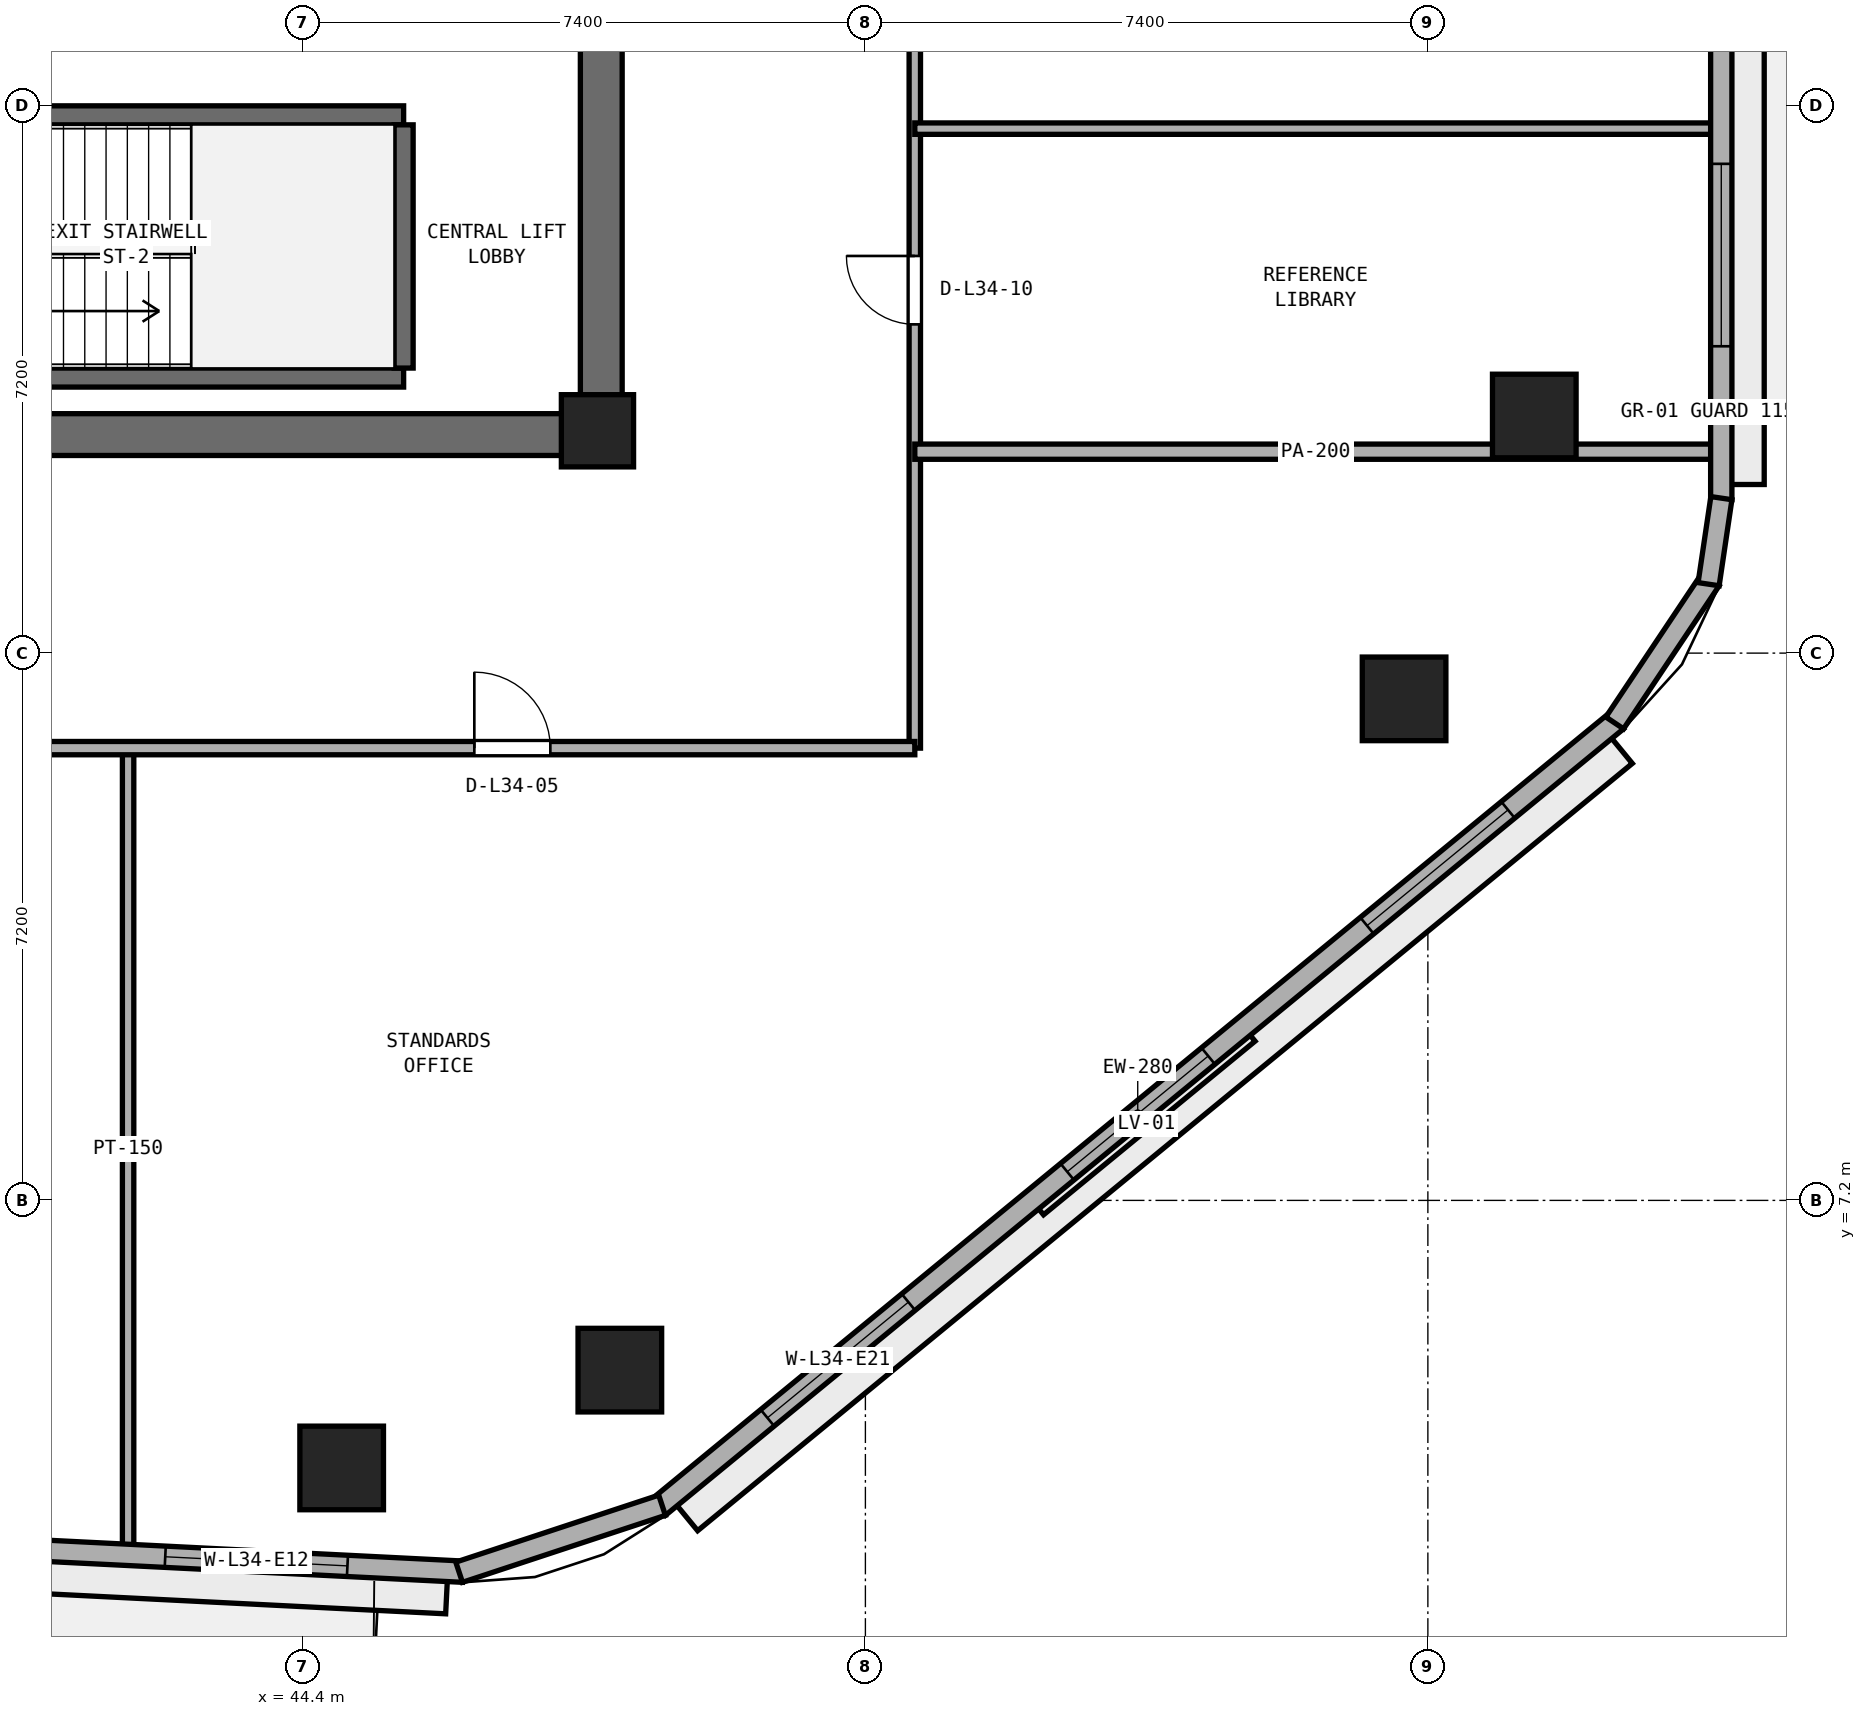
"""IFC4 building model, lengths in metres.
Left out: names, types, materials, properties, quantities, classifications, styles, units other than length and angle.
Written with IfcOpenShell. Run it as: python <this file> out.ifc"""

import sys

from ifc_helpers import new_model, si_unit, direction, frame, frame_2d, origin, origin_2d, place, context, subcontext, project, spatial, rectangle, extrude, element, fill, save


model = new_model("IFC4")
c1 = context("Model", 3, precision=1e-05, world=origin(), true_north=direction((0.0, 1.0)))
c2 = subcontext(c1, "Body", "Model", "MODEL_VIEW")
j1 = project(units=[si_unit("LENGTHUNIT", "METRE"), si_unit("PLANEANGLEUNIT", "RADIAN")], contexts=[c1])
p1 = place(None, origin())
s1 = spatial("IfcSite", under=j1, at=p1, CompositionType="ELEMENT")
p2 = place(p1, origin())
s2 = spatial("IfcBuilding", under=s1, at=p2, CompositionType="ELEMENT")
p3 = place(p2, frame((0.0, 0.0, 136.4)))
s3 = spatial("IfcBuildingStorey", under=s2, at=p3, CompositionType="ELEMENT", Elevation=136.4)
p4 = place(p3, frame((25.4, 17.275, 0.0), z_axis=(0.0, 0.0, 1.0), x_axis=(1.0, 0.0, 0.0)))
e1 = element("IfcWall", 1, at=p4, inside=s3, PredefinedType="SHEAR", context=c2, shape_type="SweptSolid", body=[
    extrude(rectangle(XDim=23.2, YDim=0.55, at=frame_2d((11.6, 0.0))), origin(), (0.0, 0.0, 1.0), 3.54),
])
p5 = place(p3, frame((48.325, 17.55, 0.0), z_axis=(0.0, 0.0, 1.0), x_axis=(0.0, 1.0, 0.0)))
e2 = element("IfcWall", 2, at=p5, inside=s3, PredefinedType="SHEAR", context=c2, shape_type="SweptSolid", body=[
    extrude(rectangle(XDim=15.3, YDim=0.55, at=frame_2d((7.65, 0.0))), origin(), (0.0, 0.0, 1.0), 3.54),
])
p6 = place(p5, frame((5.75, 0.0, 0.0)))
e3 = element("IfcOpeningElement", 3, at=p6, cuts=e2, PredefinedType="OPENING", context=c2, shape_type="SweptSolid", body=[
    extrude(rectangle(XDim=1.5, YDim=2.15, at=frame_2d((0.75, 1.075))), frame((0.0, 0.285, 0.0), z_axis=(0.0, -1.0, 0.0), x_axis=(1.0, 0.0, 0.0)), (0.0, 0.0, 1.0), 0.57),
])
p7 = place(p3, frame((48.275, 17.325, 0.0), z_axis=(0.0, 0.0, 1.0), x_axis=(1.0, 0.0, 0.0)))
e4 = element("IfcColumn", 4, at=p7, inside=s3, PredefinedType="PILASTER", context=c2, shape_type="SweptSolid", body=[
    extrude(rectangle(XDim=0.95, YDim=0.95, at=origin_2d()), origin(), (0.0, 0.0, 1.0), 3.8),
])
for number, where, z_axis, x_axis in (
    (5, (44.91, 3.68, 0.0), (0.0, 0.0, 1.0), (1.0, 0.0, 0.0)),
    (6, (48.57, 4.967, 0.0), (0.0, 0.0, 1.0), (1.0, 0.0, 0.0)),
    (7, (58.887, 13.798, 0.0), (0.0, 0.0, 1.0), (1.0, 0.0, 0.0)),
    (8, (60.6, 17.519, 0.0), (0.0, 0.0, 1.0), (1.0, 0.0, 0.0)),
):
    element("IfcColumn", number, at=place(p3, frame(where, z_axis=z_axis, x_axis=x_axis)), inside=s3, PredefinedType="COLUMN", context=c2, shape_type="SweptSolid", body=[
        extrude(rectangle(XDim=1.1, YDim=1.1, at=origin_2d()), origin(), (0.0, 0.0, 1.0), 3.8),
    ])
for number, where, z_axis, x_axis in (
    (9, (38.425, 18.025, 0.0), (0.0, 0.0, 1.0), (1.0, 0.0, 0.0)),
    (10, (38.425, 21.475, 0.0), (0.0, 0.0, 1.0), (1.0, 0.0, 0.0)),
):
    element("IfcWall", number, at=place(p3, frame(where, z_axis=z_axis, x_axis=x_axis)), inside=s3, PredefinedType="SHEAR", context=c2, shape_type="SweptSolid", body=[
        extrude(rectangle(XDim=7.3, YDim=0.25, at=frame_2d((3.65, 0.0))), origin(), (0.0, 0.0, 1.0), 3.54),
    ])
p8 = place(p3, frame((45.725, 18.15, 0.0), z_axis=(0.0, 0.0, 1.0), x_axis=(0.0, 1.0, 0.0)))
e11 = element("IfcWall", 11, at=p8, inside=s3, PredefinedType="SHEAR", context=c2, shape_type="SweptSolid", body=[
    extrude(rectangle(XDim=3.2, YDim=0.25, at=frame_2d((1.6, 0.0))), origin(), (0.0, 0.0, 1.0), 3.54),
])
p9 = place(p3, frame((52.45, 13.15, 0.0), z_axis=(0.0, 0.0, 1.0), x_axis=(0.0, 1.0, 0.0)))
e12 = element("IfcWall", 12, at=p9, inside=s3, PredefinedType="PARTITIONING", context=c2, shape_type="SweptSolid", body=[
    extrude(rectangle(XDim=10.7, YDim=0.15, at=frame_2d((5.35, 0.0))), origin(), (0.0, 0.0, 1.0), 3.54),
])
p10 = place(p9, frame((5.575, 0.0, 0.0)))
e13 = element("IfcOpeningElement", 13, at=p10, cuts=e12, PredefinedType="OPENING", context=c2, shape_type="SweptSolid", body=[
    extrude(rectangle(XDim=0.9, YDim=2.1, at=frame_2d((0.45, 1.05))), frame((0.0, 0.085, 0.0), z_axis=(0.0, -1.0, 0.0), x_axis=(1.0, 0.0, 0.0)), (0.0, 0.0, 1.0), 0.17),
])
p11 = place(p3, frame((42.1, 2.601, 0.0), z_axis=(0.0, 0.0, 1.0), x_axis=(0.0, 1.0, 0.0)))
e14 = element("IfcWall", 14, at=p11, inside=s3, PredefinedType="PARTITIONING", context=c2, shape_type="SweptSolid", body=[
    extrude(rectangle(XDim=10.549, YDim=0.15, at=frame_2d((5.274, 0.0))), origin(), (0.0, 0.0, 1.0), 3.54),
])
p12 = place(p3, frame((21.55, 13.15, 0.0), z_axis=(0.0, 0.0, 1.0), x_axis=(1.0, 0.0, 0.0)))
e15 = element("IfcWall", 15, at=p12, inside=s3, PredefinedType="PARTITIONING", context=c2, shape_type="SweptSolid", body=[
    extrude(rectangle(XDim=30.9, YDim=0.175, at=frame_2d((15.45, 0.0))), origin(), (0.0, 0.0, 1.0), 3.54),
])
p13 = place(p12, frame((4.145, 0.0, 0.0)))
e16 = element("IfcOpeningElement", 16, at=p13, cuts=e15, PredefinedType="OPENING", context=c2, shape_type="SweptSolid", body=[
    extrude(rectangle(XDim=1.0, YDim=2.12, at=frame_2d((0.5, 1.06))), frame((0.0, 0.097, 0.0), z_axis=(0.0, -1.0, 0.0), x_axis=(1.0, 0.0, 0.0)), (0.0, 0.0, 1.0), 0.195),
])
p14 = place(p12, frame((14.3, 0.0, 0.0)))
e17 = element("IfcOpeningElement", 17, at=p14, cuts=e15, PredefinedType="OPENING", context=c2, shape_type="SweptSolid", body=[
    extrude(rectangle(XDim=1.0, YDim=2.12, at=frame_2d((0.5, 1.06))), frame((0.0, 0.097, 0.0), z_axis=(0.0, -1.0, 0.0), x_axis=(1.0, 0.0, 0.0)), (0.0, 0.0, 1.0), 0.195),
])
p15 = place(p12, frame((25.105, 0.0, 0.0)))
e18 = element("IfcOpeningElement", 18, at=p15, cuts=e15, PredefinedType="OPENING", context=c2, shape_type="SweptSolid", body=[
    extrude(rectangle(XDim=1.0, YDim=2.12, at=frame_2d((0.5, 1.06))), frame((0.0, 0.097, 0.0), z_axis=(0.0, -1.0, 0.0), x_axis=(1.0, 0.0, 0.0)), (0.0, 0.0, 1.0), 0.195),
])
p16 = place(p3, frame((52.45, 17.05, 0.0), z_axis=(0.0, 0.0, 1.0), x_axis=(1.0, 0.0, 0.0)))
e19 = element("IfcWall", 19, at=p16, inside=s3, PredefinedType="PARTITIONING", context=c2, shape_type="SweptSolid", body=[
    extrude(rectangle(XDim=10.545, YDim=0.2, at=frame_2d((5.272, 0.0))), origin(), (0.0, 0.0, 1.0), 3.54),
])
p17 = place(p3, frame((52.45, 21.3, 0.0), z_axis=(0.0, 0.0, 1.0), x_axis=(1.0, 0.0, 0.0)))
e20 = element("IfcWall", 20, at=p17, inside=s3, PredefinedType="PARTITIONING", context=c2, shape_type="SweptSolid", body=[
    extrude(rectangle(XDim=10.545, YDim=0.15, at=frame_2d((5.272, 0.0))), origin(), (0.0, 0.0, 1.0), 3.54),
])
p18 = place(p3, frame((29.195, 3.184, 0.0), z_axis=(0.0, 0.0, 1.0), x_axis=(0.998743400978, -0.05011605535, 0.0)))
e21 = element("IfcWall", 21, at=p18, inside=s3, PredefinedType="STANDARD", context=c2, shape_type="SweptSolid", body=[
    extrude(rectangle(XDim=17.333, YDim=0.28, at=frame_2d((8.667, 0.0))), origin(), (0.0, 0.0, 1.0), 3.54),
])
p19 = place(p18, frame((8.116, 0.0, 0.0)))
e22 = element("IfcOpeningElement", 22, at=p19, cuts=e21, PredefinedType="OPENING", context=c2, shape_type="SweptSolid", body=[
    extrude(rectangle(XDim=1.1, YDim=2.2, at=frame_2d((0.55, 1.1))), frame((0.0, 0.15, 0.0), z_axis=(0.0, -1.0, 0.0), x_axis=(1.0, 0.0, 0.0)), (0.0, 0.0, 1.0), 0.3),
])
p20 = place(p18, frame((2.022, 0.0, 0.9)))
e23 = element("IfcOpeningElement", 23, at=p20, cuts=e21, PredefinedType="OPENING", context=c2, shape_type="SweptSolid", body=[
    extrude(rectangle(XDim=2.4, YDim=1.75, at=frame_2d((1.2, 0.875))), frame((0.0, 0.15, 0.0), z_axis=(0.0, -1.0, 0.0), x_axis=(1.0, 0.0, 0.0)), (0.0, 0.0, 1.0), 0.3),
])
p21 = place(p18, frame((13.411, 0.0, 0.9)))
e24 = element("IfcOpeningElement", 24, at=p21, cuts=e21, PredefinedType="OPENING", context=c2, shape_type="SweptSolid", body=[
    extrude(rectangle(XDim=2.4, YDim=1.75, at=frame_2d((1.2, 0.875))), frame((0.0, 0.15, 0.0), z_axis=(0.0, -1.0, 0.0), x_axis=(1.0, 0.0, 0.0)), (0.0, 0.0, 1.0), 0.3),
])
p22 = place(p3, frame((49.08, 3.164, 0.0), z_axis=(0.0, 0.0, 1.0), x_axis=(0.772937830186, 0.634481765433, 0.0)))
e25 = element("IfcWall", 25, at=p22, inside=s3, PredefinedType="STANDARD", context=c2, shape_type="SweptSolid", body=[
    extrude(rectangle(XDim=16.309, YDim=0.28, at=frame_2d((8.154, 0.0))), origin(), (0.0, 0.0, 1.0), 3.54),
])
p23 = place(p22, frame((1.852, 0.0, 0.9)))
e26 = element("IfcOpeningElement", 26, at=p23, cuts=e25, PredefinedType="OPENING", context=c2, shape_type="SweptSolid", body=[
    extrude(rectangle(XDim=2.4, YDim=1.75, at=frame_2d((1.2, 0.875))), frame((0.0, 0.15, 0.0), z_axis=(0.0, -1.0, 0.0), x_axis=(1.0, 0.0, 0.0)), (0.0, 0.0, 1.0), 0.3),
])
p24 = place(p22, frame((6.954, 0.0, 0.9)))
e27 = element("IfcOpeningElement", 27, at=p24, cuts=e25, PredefinedType="OPENING", context=c2, shape_type="SweptSolid", body=[
    extrude(rectangle(XDim=2.4, YDim=1.75, at=frame_2d((1.2, 0.875))), frame((0.0, 0.15, 0.0), z_axis=(0.0, -1.0, 0.0), x_axis=(1.0, 0.0, 0.0)), (0.0, 0.0, 1.0), 0.3),
])
p25 = place(p22, frame((12.057, 0.0, 0.9)))
e28 = element("IfcOpeningElement", 28, at=p25, cuts=e25, PredefinedType="OPENING", context=c2, shape_type="SweptSolid", body=[
    extrude(rectangle(XDim=2.4, YDim=1.75, at=frame_2d((1.2, 0.875))), frame((0.0, 0.15, 0.0), z_axis=(0.0, -1.0, 0.0), x_axis=(1.0, 0.0, 0.0)), (0.0, 0.0, 1.0), 0.3),
])
p26 = place(p3, frame((63.06, 16.418, 0.0), z_axis=(0.0, 0.0, 1.0), x_axis=(0.0, 1.0, 0.0)))
e29 = element("IfcWall", 29, at=p26, inside=s3, PredefinedType="STANDARD", context=c2, shape_type="SweptSolid", body=[
    extrude(rectangle(XDim=18.812, YDim=0.28, at=frame_2d((9.406, 0.0))), origin(), (0.0, 0.0, 1.0), 3.54),
])
p27 = place(p26, frame((8.556, 0.0, 0.0)))
e30 = element("IfcOpeningElement", 30, at=p27, cuts=e29, PredefinedType="OPENING", context=c2, shape_type="SweptSolid", body=[
    extrude(rectangle(XDim=1.1, YDim=2.2, at=frame_2d((0.55, 1.1))), frame((0.0, 0.15, 0.0), z_axis=(0.0, -1.0, 0.0), x_axis=(1.0, 0.0, 0.0)), (0.0, 0.0, 1.0), 0.3),
])
p28 = place(p26, frame((2.019, 0.0, 0.9)))
e31 = element("IfcOpeningElement", 31, at=p28, cuts=e29, PredefinedType="OPENING", context=c2, shape_type="SweptSolid", body=[
    extrude(rectangle(XDim=2.4, YDim=1.75, at=frame_2d((1.2, 0.875))), frame((0.0, 0.15, 0.0), z_axis=(0.0, -1.0, 0.0), x_axis=(1.0, 0.0, 0.0)), (0.0, 0.0, 1.0), 0.3),
])
p29 = place(p26, frame((14.143, 0.0, 0.9)))
e32 = element("IfcOpeningElement", 32, at=p29, cuts=e29, PredefinedType="OPENING", context=c2, shape_type="SweptSolid", body=[
    extrude(rectangle(XDim=2.4, YDim=1.75, at=frame_2d((1.2, 0.875))), frame((0.0, 0.15, 0.0), z_axis=(0.0, -1.0, 0.0), x_axis=(1.0, 0.0, 0.0)), (0.0, 0.0, 1.0), 0.3),
])
p30 = place(p3, frame((46.455, 2.309, 0.0), z_axis=(0.0, 0.0, 1.0), x_axis=(0.949677222099, 0.313230224955, 0.0)))
e33 = element("IfcWall", 33, at=p30, inside=s3, PredefinedType="STANDARD", context=c2, shape_type="SweptSolid", body=[
    extrude(rectangle(XDim=2.811, YDim=0.28, at=frame_2d((1.406, 0.0))), origin(), (0.0, 0.0, 1.0), 3.54),
])
p31 = place(p3, frame((61.658, 13.482, 0.0), z_axis=(0.0, 0.0, 1.0), x_axis=(0.555521224344, 0.831502356764, 0.0)))
e34 = element("IfcWall", 34, at=p31, inside=s3, PredefinedType="STANDARD", context=c2, shape_type="SweptSolid", body=[
    extrude(rectangle(XDim=2.264, YDim=0.28, at=frame_2d((1.132, 0.0))), origin(), (0.0, 0.0, 1.0), 3.54),
])
p32 = place(p3, frame((62.894, 15.307, 0.0), z_axis=(0.0, 0.0, 1.0), x_axis=(0.146796104284, 0.989166772474, 0.0)))
e35 = element("IfcWall", 35, at=p32, inside=s3, PredefinedType="STANDARD", context=c2, shape_type="SweptSolid", body=[
    extrude(rectangle(XDim=1.144, YDim=0.28, at=frame_2d((0.572, 0.0))), origin(), (0.0, 0.0, 1.0), 3.54),
])
p33 = place(p15, origin())
e36 = element("IfcDoor", 36, at=p33, inside=s3, OperationType="SINGLE_SWING_LEFT", PredefinedType="DOOR", context=c2, shape_type="SweptSolid", body=[
    extrude(rectangle(XDim=1.0, YDim=2.12, at=frame_2d((0.5, 1.06))), frame((0.0, 0.025, 0.0), z_axis=(0.0, -1.0, 0.0), x_axis=(1.0, 0.0, 0.0)), (0.0, 0.0, 1.0), 0.05),
])
fill(e18, e36)
p34 = place(p10, origin())
e37 = element("IfcDoor", 37, at=p34, inside=s3, OperationType="SINGLE_SWING_RIGHT", PredefinedType="DOOR", context=c2, shape_type="SweptSolid", body=[
    extrude(rectangle(XDim=0.9, YDim=2.1, at=frame_2d((0.45, 1.05))), frame((0.0, 0.025, 0.0), z_axis=(0.0, -1.0, 0.0), x_axis=(1.0, 0.0, 0.0)), (0.0, 0.0, 1.0), 0.05),
])
fill(e13, e37)
p35 = place(p21, origin())
e38 = element("IfcWindow", 38, at=p35, inside=s3, PartitioningType="SINGLE_PANEL", PredefinedType="WINDOW", context=c2, shape_type="SweptSolid", body=[
    extrude(rectangle(XDim=2.4, YDim=1.75, at=frame_2d((1.2, 0.875))), frame((0.0, 0.03, 0.0), z_axis=(0.0, -1.0, 0.0), x_axis=(1.0, 0.0, 0.0)), (0.0, 0.0, 1.0), 0.06),
])
fill(e24, e38)
p36 = place(p23, origin())
e39 = element("IfcWindow", 39, at=p36, inside=s3, PartitioningType="SINGLE_PANEL", PredefinedType="WINDOW", context=c2, shape_type="SweptSolid", body=[
    extrude(rectangle(XDim=2.4, YDim=1.75, at=frame_2d((1.2, 0.875))), frame((0.0, 0.03, 0.0), z_axis=(0.0, -1.0, 0.0), x_axis=(1.0, 0.0, 0.0)), (0.0, 0.0, 1.0), 0.06),
])
fill(e26, e39)
p37 = place(p24, origin())
e40 = element("IfcWindow", 40, at=p37, inside=s3, PartitioningType="SINGLE_PANEL", PredefinedType="WINDOW", context=c2, shape_type="SweptSolid", body=[
    extrude(rectangle(XDim=2.4, YDim=1.75, at=frame_2d((1.2, 0.875))), frame((0.0, 0.03, 0.0), z_axis=(0.0, -1.0, 0.0), x_axis=(1.0, 0.0, 0.0)), (0.0, 0.0, 1.0), 0.06),
])
fill(e27, e40)
p38 = place(p25, origin())
e41 = element("IfcWindow", 41, at=p38, inside=s3, PartitioningType="SINGLE_PANEL", PredefinedType="WINDOW", context=c2, shape_type="SweptSolid", body=[
    extrude(rectangle(XDim=2.4, YDim=1.75, at=frame_2d((1.2, 0.875))), frame((0.0, 0.03, 0.0), z_axis=(0.0, -1.0, 0.0), x_axis=(1.0, 0.0, 0.0)), (0.0, 0.0, 1.0), 0.06),
])
fill(e28, e41)
p39 = place(p28, origin())
e42 = element("IfcWindow", 42, at=p39, inside=s3, PartitioningType="SINGLE_PANEL", PredefinedType="WINDOW", context=c2, shape_type="SweptSolid", body=[
    extrude(rectangle(XDim=2.4, YDim=1.75, at=frame_2d((1.2, 0.875))), frame((0.0, 0.03, 0.0), z_axis=(0.0, -1.0, 0.0), x_axis=(1.0, 0.0, 0.0)), (0.0, 0.0, 1.0), 0.06),
])
fill(e31, e42)
save(model, sys.argv[1])
